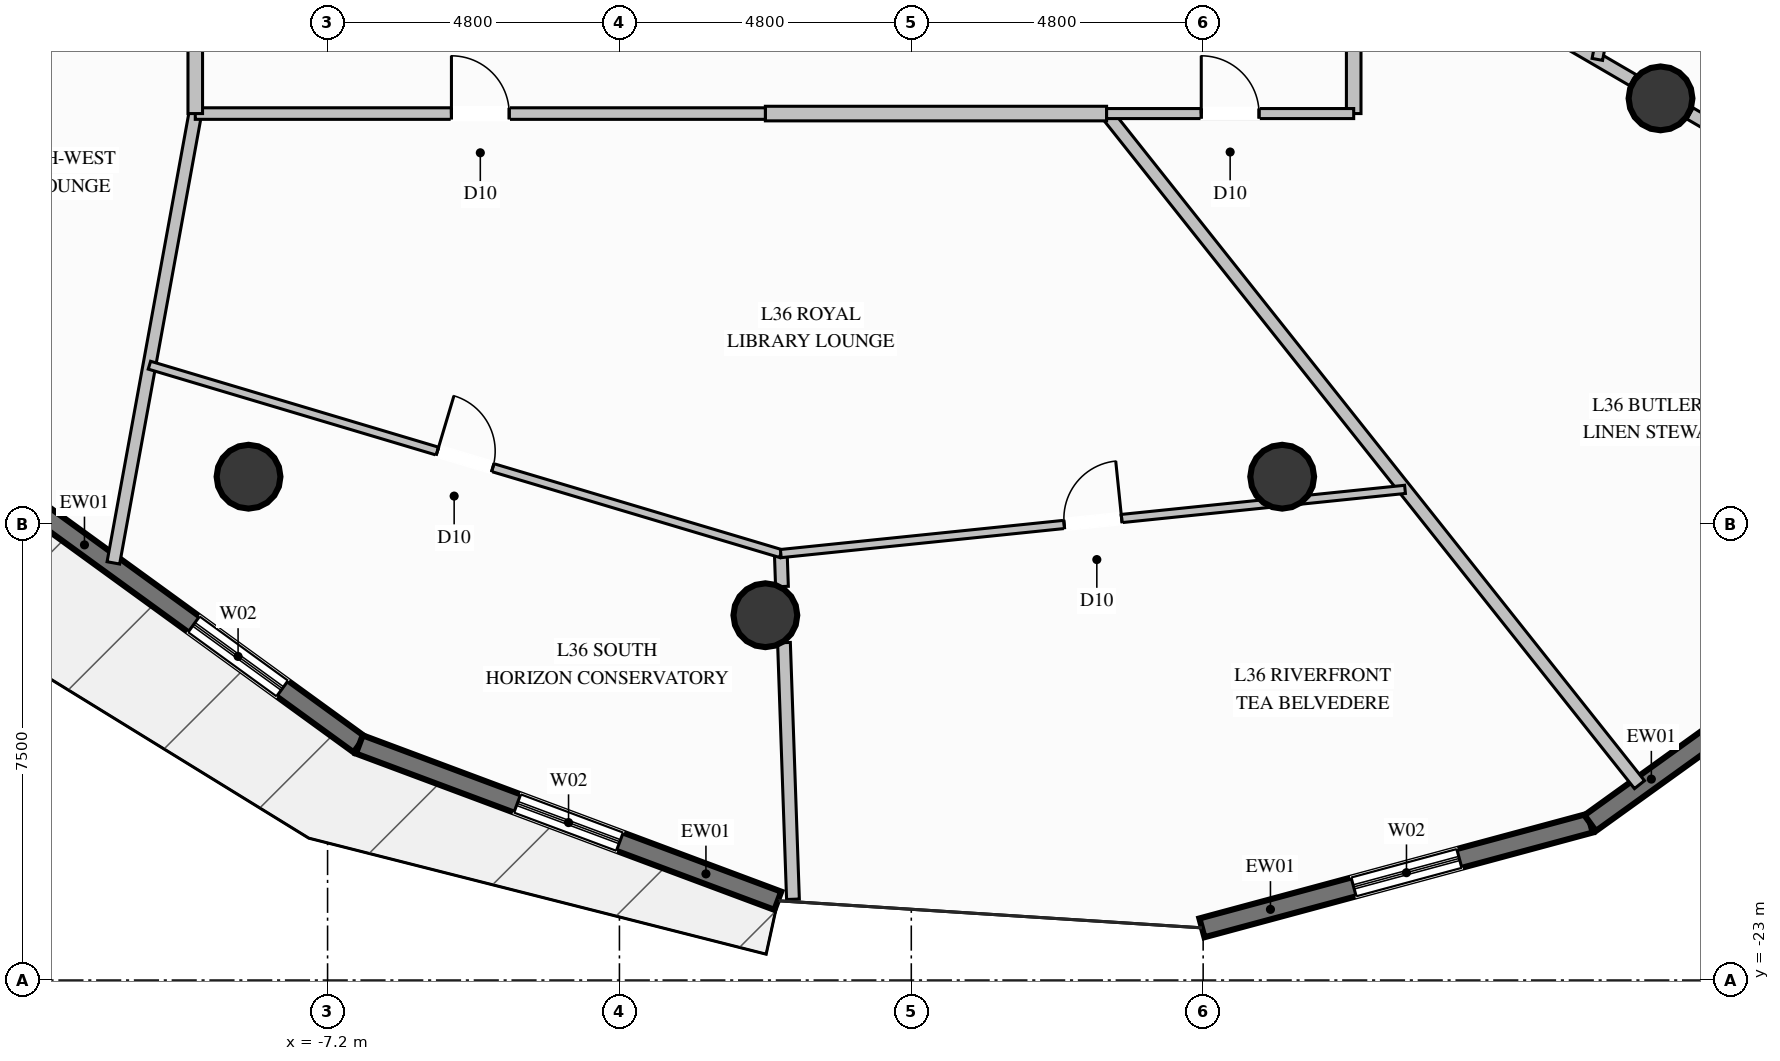
"""IFC4 building model, lengths in metres.
Left out: names, types, materials, properties, quantities, classifications, styles, units other than length and angle.
Written with IfcOpenShell. Run it as: python <this file> out.ifc"""

import sys

from ifc_helpers import new_model, si_unit, direction, frame, frame_2d, origin, origin_2d, place, context, subcontext, project, spatial, rectangle, circle, extrude, element, fill, save


model = new_model("IFC4")
c1 = context("Model", 3, precision=1e-05, world=origin(), true_north=direction((0.0, 1.0)))
c2 = subcontext(c1, "Body", "Model", "MODEL_VIEW")
j1 = project(units=[si_unit("LENGTHUNIT", "METRE"), si_unit("PLANEANGLEUNIT", "RADIAN")], contexts=[c1])
p1 = place(None, origin())
s1 = spatial("IfcSite", under=j1, at=p1, CompositionType="ELEMENT")
p2 = place(p1, origin())
s2 = spatial("IfcBuilding", under=s1, at=p2, CompositionType="ELEMENT")
p3 = place(p2, frame((0.0, 0.0, 142.2)))
s3 = spatial("IfcBuildingStorey", under=s2, at=p3, CompositionType="ELEMENT", Elevation=142.2)
for number, where, z_axis, x_axis in (
    (1, (-8.5, -14.722, 0.0), (0.0, 0.0, 1.0), (1.0, 0.0, 0.0)),
    (2, (0.0, -17.0, 0.0), (0.0, 0.0, 1.0), (1.0, 0.0, 0.0)),
    (3, (8.5, -14.722, 0.0), (0.0, 0.0, 1.0), (1.0, 0.0, 0.0)),
    (4, (14.722, -8.5, 0.0), (0.0, 0.0, 1.0), (1.0, 0.0, 0.0)),
):
    element("IfcColumn", number, at=place(p3, frame(where, z_axis=z_axis, x_axis=x_axis)), inside=s3, PredefinedType="COLUMN", context=c2, shape_type="SweptSolid", body=[
        extrude(circle(Radius=0.525, at=origin_2d()), origin(), (0.0, 0.0, 1.0), 3.6),
    ])
p4 = place(p3, frame((-6.678, -19.125, 0.0), z_axis=(0.0, 0.0, 1.0), x_axis=(-0.809180040303, 0.587560773347, 0.0)))
e5 = element("IfcWall", 5, at=p4, inside=s3, PredefinedType="SOLIDWALL", context=c2, shape_type="SweptSolid", body=[
    extrude(rectangle(XDim=7.558, YDim=0.32, at=frame_2d((3.779, 0.0))), origin(), (0.0, 0.0, 1.0), 3.35),
])
p5 = place(p4, frame((1.564, 0.0, 0.35)))
e6 = element("IfcOpeningElement", 6, at=p5, cuts=e5, PredefinedType="OPENING", context=c2, shape_type="SweptSolid", body=[
    extrude(rectangle(XDim=1.8, YDim=2.6, at=frame_2d((0.9, 1.3))), frame((0.0, 0.17, 0.0), z_axis=(0.0, -1.0, 0.0), x_axis=(1.0, 0.0, 0.0)), (0.0, 0.0, 1.0), 0.34),
])
p6 = place(p3, frame((0.205, -21.695, 0.0), z_axis=(0.0, 0.0, 1.0), x_axis=(-0.936823947669, 0.349801216512, 0.0)))
e7 = element("IfcWall", 7, at=p6, inside=s3, PredefinedType="SOLIDWALL", context=c2, shape_type="SweptSolid", body=[
    extrude(rectangle(XDim=7.347, YDim=0.32, at=frame_2d((3.674, 0.0))), origin(), (0.0, 0.0, 1.0), 3.35),
])
p7 = place(p6, frame((2.774, 0.0, 0.35)))
e8 = element("IfcOpeningElement", 8, at=p7, cuts=e7, PredefinedType="OPENING", context=c2, shape_type="SweptSolid", body=[
    extrude(rectangle(XDim=1.8, YDim=2.6, at=frame_2d((0.9, 1.3))), frame((0.0, 0.17, 0.0), z_axis=(0.0, -1.0, 0.0), x_axis=(1.0, 0.0, 0.0)), (0.0, 0.0, 1.0), 0.34),
])
p8 = place(p3, frame((13.565, -20.419, 0.0), z_axis=(0.0, 0.0, 1.0), x_axis=(-0.965496962539, -0.260414314753, 0.0)))
e9 = element("IfcWall", 9, at=p8, inside=s3, PredefinedType="SOLIDWALL", context=c2, shape_type="SweptSolid", body=[
    extrude(rectangle(XDim=6.613, YDim=0.32, at=frame_2d((3.307, 0.0))), origin(), (0.0, 0.0, 1.0), 3.35),
])
p9 = place(p8, frame((2.229, 0.0, 0.35)))
e10 = element("IfcOpeningElement", 10, at=p9, cuts=e9, PredefinedType="OPENING", context=c2, shape_type="SweptSolid", body=[
    extrude(rectangle(XDim=1.8, YDim=2.6, at=frame_2d((0.9, 1.3))), frame((0.0, 0.17, 0.0), z_axis=(0.0, -1.0, 0.0), x_axis=(1.0, 0.0, 0.0)), (0.0, 0.0, 1.0), 0.34),
])
p10 = place(p3, frame((18.735, -16.699, 0.0), z_axis=(0.0, 0.0, 1.0), x_axis=(-0.811724052587, -0.584041147909, 0.0)))
e11 = element("IfcWall", 11, at=p10, inside=s3, PredefinedType="SOLIDWALL", context=c2, shape_type="SweptSolid", body=[
    extrude(rectangle(XDim=6.369, YDim=0.32, at=frame_2d((3.185, 0.0))), origin(), (0.0, 0.0, 1.0), 3.35),
])
p11 = place(p10, frame((1.84, 0.0, 0.35)))
e12 = element("IfcOpeningElement", 12, at=p11, cuts=e11, PredefinedType="OPENING", context=c2, shape_type="SweptSolid", body=[
    extrude(rectangle(XDim=1.8, YDim=2.6, at=frame_2d((0.9, 1.3))), frame((0.0, 0.17, 0.0), z_axis=(0.0, -1.0, 0.0), x_axis=(1.0, 0.0, 0.0)), (0.0, 0.0, 1.0), 0.34),
])
p12 = place(p3, frame((-9.376, -5.525, 0.0), z_axis=(0.0, 0.0, 1.0), x_axis=(-0.87160595107, -0.49020716647, 0.0)))
e13 = element("IfcWall", 13, at=p12, inside=s3, PredefinedType="PARTITIONING", context=c2, shape_type="SweptSolid", body=[
    extrude(rectangle(XDim=5.573, YDim=0.21, at=frame_2d((2.787, 0.0))), origin(), (0.0, 0.0, 1.0), 2.718),
])
p13 = place(p3, frame((9.676, -5.525, 0.0), z_axis=(0.0, 0.0, 1.0), x_axis=(0.864030429533, -0.503439586088, 0.0)))
e14 = element("IfcWall", 14, at=p13, inside=s3, PredefinedType="PARTITIONING", context=c2, shape_type="SweptSolid", body=[
    extrude(rectangle(XDim=5.313, YDim=0.21, at=frame_2d((2.657, 0.0))), origin(), (0.0, 0.0, 1.0), 2.718),
])
p14 = place(p3, frame((15.207, -8.748, 0.0), z_axis=(0.0, 0.0, 1.0), x_axis=(0.864082158656, -0.503350795263, 0.0)))
e15 = element("IfcWall", 15, at=p14, inside=s3, PredefinedType="PARTITIONING", context=c2, shape_type="SweptSolid", body=[
    extrude(rectangle(XDim=7.238, YDim=0.21, at=frame_2d((3.619, 0.0))), origin(), (0.0, 0.0, 1.0), 3.35),
])
p15 = place(p3, frame((13.683, -7.859, 0.0), z_axis=(0.0, 0.0, 1.0), x_axis=(0.187717343652, 0.982223090185, 0.0)))
e16 = element("IfcWall", 16, at=p15, inside=s3, PredefinedType="PLUMBINGWALL", context=c2, shape_type="SweptSolid", body=[
    extrude(rectangle(XDim=3.318, YDim=0.175, at=frame_2d((1.659, 0.0))), origin(), (0.0, 0.0, 1.0), 3.35),
])
p16 = place(p3, frame((5.612, -8.75, 0.0), z_axis=(0.0, 0.0, 1.0), x_axis=(0.621887455735, -0.78310662901, 0.0)))
e17 = element("IfcWall", 17, at=p16, inside=s3, PredefinedType="PARTITIONING", context=c2, shape_type="SweptSolid", body=[
    extrude(rectangle(XDim=14.093, YDim=0.21, at=frame_2d((7.046, 0.0))), origin(), (0.0, 0.0, 1.0), 3.35),
])
p17 = place(p3, frame((-9.376, -8.75, 0.0), z_axis=(0.0, 0.0, 1.0), x_axis=(-0.17933451975, -0.983788153022, 0.0)))
e18 = element("IfcWall", 18, at=p17, inside=s3, PredefinedType="PARTITIONING", context=c2, shape_type="SweptSolid", body=[
    extrude(rectangle(XDim=7.511, YDim=0.21, at=frame_2d((3.755, 0.0))), origin(), (0.0, 0.0, 1.0), 3.35),
])
p18 = place(p3, frame((0.0, -8.75, 0.0), z_axis=(0.0, 0.0, 1.0), x_axis=(1.0, 0.0, 0.0)))
e19 = element("IfcWall", 19, at=p18, inside=s3, PredefinedType="PARTITIONING", context=c2, shape_type="SweptSolid", body=[
    extrude(rectangle(XDim=5.612, YDim=0.24, at=frame_2d((2.806, 0.0))), origin(), (0.0, 0.0, 1.0), 3.35),
])
p19 = place(p3, frame((-9.376, -8.75, 0.0), z_axis=(0.0, 0.0, 1.0), x_axis=(1.0, 0.0, 0.0)))
e20 = element("IfcWall", 20, at=p19, inside=s3, PredefinedType="PARTITIONING", context=c2, shape_type="SweptSolid", body=[
    extrude(rectangle(XDim=9.376, YDim=0.19, at=frame_2d((4.688, 0.0))), origin(), (0.0, 0.0, 1.0), 3.35),
])
p20 = place(p19, frame((4.213, 0.0, 0.0)))
e21 = element("IfcOpeningElement", 21, at=p20, cuts=e20, PredefinedType="OPENING", context=c2, shape_type="SweptSolid", body=[
    extrude(rectangle(XDim=0.95, YDim=2.1, at=frame_2d((0.475, 1.05))), frame((0.0, 0.105, 0.0), z_axis=(0.0, -1.0, 0.0), x_axis=(1.0, 0.0, 0.0)), (0.0, 0.0, 1.0), 0.21),
])
p21 = place(p3, frame((-9.376, -5.525, 0.0), z_axis=(0.0, 0.0, 1.0), x_axis=(0.0, -1.0, 0.0)))
e22 = element("IfcWall", 22, at=p21, inside=s3, PredefinedType="PARTITIONING", context=c2, shape_type="SweptSolid", body=[
    extrude(rectangle(XDim=3.225, YDim=0.24, at=frame_2d((1.613, 0.0))), origin(), (0.0, 0.0, 1.0), 3.35),
])
p22 = place(p21, frame((1.112, 0.0, 0.0)))
e23 = element("IfcOpeningElement", 23, at=p22, cuts=e22, PredefinedType="OPENING", context=c2, shape_type="SweptSolid", body=[
    extrude(rectangle(XDim=1.0, YDim=2.2, at=frame_2d((0.5, 1.1))), frame((0.0, 0.13, 0.0), z_axis=(0.0, -1.0, 0.0), x_axis=(1.0, 0.0, 0.0)), (0.0, 0.0, 1.0), 0.26),
])
p23 = place(p3, frame((0.254, -15.986, 0.0), z_axis=(0.0, 0.0, 1.0), x_axis=(0.035113468423, -0.999383332028, 0.0)))
e24 = element("IfcWall", 24, at=p23, inside=s3, PredefinedType="PARTITIONING", context=c2, shape_type="SweptSolid", body=[
    extrude(rectangle(XDim=0.542, YDim=0.21, at=frame_2d((0.271, 0.0))), origin(), (0.0, 0.0, 1.0), 3.35),
])
p24 = place(p3, frame((0.306, -17.451, 0.0), z_axis=(0.0, 0.0, 1.0), x_axis=(0.035095520117, -0.999383962483, 0.0)))
e25 = element("IfcWall", 25, at=p24, inside=s3, PredefinedType="PARTITIONING", context=c2, shape_type="SweptSolid", body=[
    extrude(rectangle(XDim=4.223, YDim=0.21, at=frame_2d((2.111, 0.0))), origin(), (0.0, 0.0, 1.0), 3.35),
])
p25 = place(p3, frame((-10.13, -12.888, 0.0), z_axis=(0.0, 0.0, 1.0), x_axis=(0.958256793562, -0.28590893234, 0.0)))
e26 = element("IfcWall", 26, at=p25, inside=s3, PredefinedType="PARTITIONING", context=c2, shape_type="SweptSolid", body=[
    extrude(rectangle(XDim=10.836, YDim=0.135, at=frame_2d((5.418, 0.0))), origin(), (0.0, 0.0, 1.0), 3.35),
])
p26 = place(p25, frame((4.943, 0.0, 0.0)))
e27 = element("IfcOpeningElement", 27, at=p26, cuts=e26, PredefinedType="OPENING", context=c2, shape_type="SweptSolid", body=[
    extrude(rectangle(XDim=0.95, YDim=2.1, at=frame_2d((0.475, 1.05))), frame((0.0, 0.078, 0.0), z_axis=(0.0, -1.0, 0.0), x_axis=(1.0, 0.0, 0.0)), (0.0, 0.0, 1.0), 0.155),
])
p27 = place(p3, frame((0.254, -15.986, 0.0), z_axis=(0.0, 0.0, 1.0), x_axis=(0.994749746349, 0.102337393643, 0.0)))
e28 = element("IfcWall", 28, at=p27, inside=s3, PredefinedType="PARTITIONING", context=c2, shape_type="SweptSolid", body=[
    extrude(rectangle(XDim=10.32, YDim=0.135, at=frame_2d((5.16, 0.0))), origin(), (0.0, 0.0, 1.0), 2.879),
])
p28 = place(p27, frame((4.685, 0.0, 0.0)))
e29 = element("IfcOpeningElement", 29, at=p28, cuts=e28, PredefinedType="OPENING", context=c2, shape_type="SweptSolid", body=[
    extrude(rectangle(XDim=0.95, YDim=2.1, at=frame_2d((0.475, 1.05))), frame((0.0, 0.078, 0.0), z_axis=(0.0, -1.0, 0.0), x_axis=(1.0, 0.0, 0.0)), (0.0, 0.0, 1.0), 0.155),
])
p29 = place(p3, frame((9.676, -8.75, 0.0), z_axis=(0.0, 0.0, 1.0), x_axis=(0.0, 1.0, 0.0)))
e30 = element("IfcWall", 30, at=p29, inside=s3, PredefinedType="PARTITIONING", context=c2, shape_type="SweptSolid", body=[
    extrude(rectangle(XDim=3.225, YDim=0.24, at=frame_2d((1.613, 0.0))), origin(), (0.0, 0.0, 1.0), 3.35),
])
p30 = place(p3, frame((5.612, -8.75, 0.0), z_axis=(0.0, 0.0, 1.0), x_axis=(1.0, 0.0, 0.0)))
e31 = element("IfcWall", 31, at=p30, inside=s3, PredefinedType="PARTITIONING", context=c2, shape_type="SweptSolid", body=[
    extrude(rectangle(XDim=4.064, YDim=0.165, at=frame_2d((2.032, 0.0))), origin(), (0.0, 0.0, 1.0), 3.35),
])
p31 = place(p30, frame((1.557, 0.0, 0.0)))
e32 = element("IfcOpeningElement", 32, at=p31, cuts=e31, PredefinedType="OPENING", context=c2, shape_type="SweptSolid", body=[
    extrude(rectangle(XDim=0.95, YDim=2.1, at=frame_2d((0.475, 1.05))), frame((0.0, 0.093, 0.0), z_axis=(0.0, -1.0, 0.0), x_axis=(1.0, 0.0, 0.0)), (0.0, 0.0, 1.0), 0.185),
])
p32 = place(p5, origin())
e33 = element("IfcWindow", 33, at=p32, inside=s3, PartitioningType="SINGLE_PANEL", PredefinedType="WINDOW", context=c2, shape_type="SweptSolid", body=[
    extrude(rectangle(XDim=1.8, YDim=2.6, at=frame_2d((0.9, 1.3))), frame((0.0, 0.03, 0.0), z_axis=(0.0, -1.0, 0.0), x_axis=(1.0, 0.0, 0.0)), (0.0, 0.0, 1.0), 0.06),
])
fill(e6, e33)
p33 = place(p7, origin())
e34 = element("IfcWindow", 34, at=p33, inside=s3, PartitioningType="SINGLE_PANEL", PredefinedType="WINDOW", context=c2, shape_type="SweptSolid", body=[
    extrude(rectangle(XDim=1.8, YDim=2.6, at=frame_2d((0.9, 1.3))), frame((0.0, 0.03, 0.0), z_axis=(0.0, -1.0, 0.0), x_axis=(1.0, 0.0, 0.0)), (0.0, 0.0, 1.0), 0.06),
])
fill(e8, e34)
p34 = place(p9, origin())
e35 = element("IfcWindow", 35, at=p34, inside=s3, PartitioningType="SINGLE_PANEL", PredefinedType="WINDOW", context=c2, shape_type="SweptSolid", body=[
    extrude(rectangle(XDim=1.8, YDim=2.6, at=frame_2d((0.9, 1.3))), frame((0.0, 0.03, 0.0), z_axis=(0.0, -1.0, 0.0), x_axis=(1.0, 0.0, 0.0)), (0.0, 0.0, 1.0), 0.06),
])
fill(e10, e35)
p35 = place(p20, origin())
e36 = element("IfcDoor", 36, at=p35, inside=s3, OperationType="SINGLE_SWING_LEFT", PredefinedType="DOOR", context=c2, shape_type="SweptSolid", body=[
    extrude(rectangle(XDim=0.95, YDim=2.1, at=frame_2d((0.475, 1.05))), frame((0.0, 0.025, 0.0), z_axis=(0.0, -1.0, 0.0), x_axis=(1.0, 0.0, 0.0)), (0.0, 0.0, 1.0), 0.05),
])
fill(e21, e36)
p36 = place(p26, origin())
e37 = element("IfcDoor", 37, at=p36, inside=s3, OperationType="SINGLE_SWING_LEFT", PredefinedType="DOOR", context=c2, shape_type="SweptSolid", body=[
    extrude(rectangle(XDim=0.95, YDim=2.1, at=frame_2d((0.475, 1.05))), frame((0.0, 0.025, 0.0), z_axis=(0.0, -1.0, 0.0), x_axis=(1.0, 0.0, 0.0)), (0.0, 0.0, 1.0), 0.05),
])
fill(e27, e37)
p37 = place(p28, origin())
e38 = element("IfcDoor", 38, at=p37, inside=s3, OperationType="SINGLE_SWING_RIGHT", PredefinedType="DOOR", context=c2, shape_type="SweptSolid", body=[
    extrude(rectangle(XDim=0.95, YDim=2.1, at=frame_2d((0.475, 1.05))), frame((0.0, 0.025, 0.0), z_axis=(0.0, -1.0, 0.0), x_axis=(1.0, 0.0, 0.0)), (0.0, 0.0, 1.0), 0.05),
])
fill(e29, e38)
p38 = place(p31, origin())
e39 = element("IfcDoor", 39, at=p38, inside=s3, OperationType="SINGLE_SWING_LEFT", PredefinedType="DOOR", context=c2, shape_type="SweptSolid", body=[
    extrude(rectangle(XDim=0.95, YDim=2.1, at=frame_2d((0.475, 1.05))), frame((0.0, 0.025, 0.0), z_axis=(0.0, -1.0, 0.0), x_axis=(1.0, 0.0, 0.0)), (0.0, 0.0, 1.0), 0.05),
])
fill(e32, e39)
save(model, sys.argv[1])
